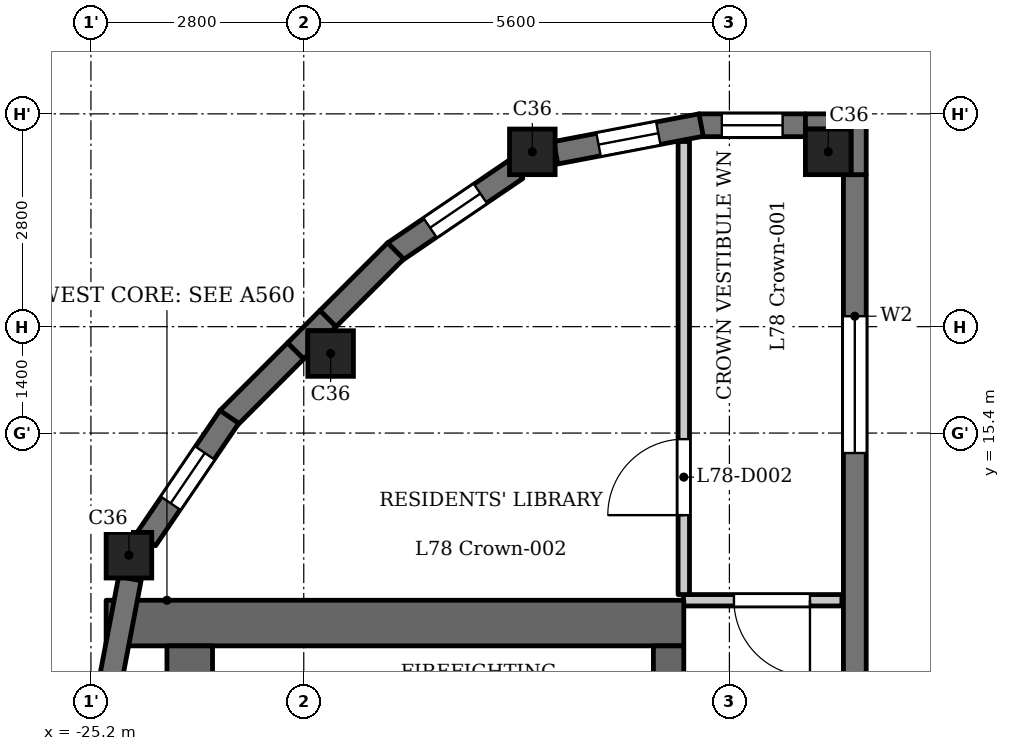
"""IFC4 building model, lengths in metres.
Left out: names, types, materials, properties, quantities, classifications, styles, units other than length and angle.
Written with IfcOpenShell. Run it as: python <this file> out.ifc"""

import sys

from ifc_helpers import new_model, si_unit, direction, frame, frame_2d, origin, origin_2d, place, context, subcontext, project, spatial, polyline, rectangle, outline, extrude, element, fill, save


model = new_model("IFC4")
c1 = context("Model", 3, precision=1e-05, world=origin(), true_north=direction((0.0, 1.0)))
c2 = subcontext(c1, "Body", "Model", "MODEL_VIEW")
j1 = project(units=[si_unit("LENGTHUNIT", "METRE"), si_unit("PLANEANGLEUNIT", "RADIAN")], contexts=[c1])
p1 = place(None, origin())
s1 = spatial("IfcSite", under=j1, at=p1, CompositionType="ELEMENT")
p2 = place(p1, origin())
s2 = spatial("IfcBuilding", under=s1, at=p2, CompositionType="ELEMENT")
p3 = place(p2, frame((0.0, 0.0, 303.4)))
s3 = spatial("IfcBuildingStorey", under=s2, at=p3, CompositionType="ELEMENT", Elevation=303.4)
for number, where, z_axis, x_axis in (
    (1, (-24.7, 13.793, 0.0), (0.0, 0.0, 1.0), (1.0, 0.0, 0.0)),
    (2, (-22.046, 16.446, 0.0), (0.0, 0.0, 1.0), (1.0, 0.0, 0.0)),
    (3, (-19.393, 19.1, 0.0), (0.0, 0.0, 1.0), (1.0, 0.0, 0.0)),
    (4, (-15.5, 19.1, 0.0), (0.0, 0.0, 1.0), (1.0, 0.0, 0.0)),
):
    element("IfcColumn", number, at=place(p3, frame(where, z_axis=z_axis, x_axis=x_axis)), inside=s3, PredefinedType="COLUMN", context=c2, shape_type="SweptSolid", body=[
        extrude(rectangle(XDim=0.6, YDim=0.6, at=origin_2d()), origin(), (0.0, 0.0, 1.0), 3.5),
    ])
p4 = place(p3, frame((-15.15, 11.5, 0.0), z_axis=(0.0, 0.0, 1.0), x_axis=(0.0, 1.0, 0.0)))
e5 = element("IfcWall", 5, at=p4, inside=s3, PredefinedType="SOLIDWALL", context=c2, shape_type="SweptSolid", body=[
    extrude(rectangle(XDim=7.3, YDim=0.3, at=frame_2d((3.65, 0.0))), origin(), (0.0, 0.0, 1.0), 3.2),
])
p5 = place(p4, frame((3.637, 0.0, 0.9)))
e6 = element("IfcOpeningElement", 6, at=p5, cuts=e5, PredefinedType="OPENING", context=c2, shape_type="SweptSolid", body=[
    extrude(rectangle(XDim=1.8, YDim=1.25, at=frame_2d((0.9, 0.625))), frame((0.0, 0.16, 0.0), z_axis=(0.0, -1.0, 0.0), x_axis=(1.0, 0.0, 0.0)), (0.0, 0.0, 1.0), 0.32),
])
p6 = place(p3, frame((-15.8, 19.45, 0.0), z_axis=(0.0, 0.0, 1.0), x_axis=(-1.0, 0.0, 0.0)))
e7 = element("IfcWall", 7, at=p6, inside=s3, PredefinedType="SOLIDWALL", context=c2, shape_type="SweptSolid", body=[
    extrude(rectangle(XDim=1.4, YDim=0.3, at=frame_2d((0.7, 0.0))), origin(), (0.0, 0.0, 1.0), 3.2),
])
p7 = place(p6, frame((0.3, 0.0, 0.6)))
e8 = element("IfcOpeningElement", 8, at=p7, cuts=e7, PredefinedType="OPENING", context=c2, shape_type="SweptSolid", body=[
    extrude(rectangle(XDim=0.8, YDim=1.55, at=frame_2d((0.4, 0.775))), frame((0.0, 0.16, 0.0), z_axis=(0.0, -1.0, 0.0), x_axis=(1.0, 0.0, 0.0)), (0.0, 0.0, 1.0), 0.32),
])
p8 = place(p3, frame((-17.172, 19.453, 0.0), z_axis=(0.0, 0.0, 1.0), x_axis=(-0.982286967073, -0.187382801553, 0.0)))
e9 = element("IfcWall", 9, at=p8, inside=s3, PredefinedType="SOLIDWALL", context=c2, shape_type="SweptSolid", body=[
    extrude(rectangle(XDim=1.948, YDim=0.3, at=frame_2d((0.974, 0.0))), origin(), (0.0, 0.0, 1.0), 2.6),
])
p9 = place(p8, frame((0.574, 0.0, 0.6)))
e10 = element("IfcOpeningElement", 10, at=p9, cuts=e9, PredefinedType="OPENING", context=c2, shape_type="SweptSolid", body=[
    extrude(rectangle(XDim=0.8, YDim=1.55, at=frame_2d((0.4, 0.775))), frame((0.0, 0.16, 0.0), z_axis=(0.0, -1.0, 0.0), x_axis=(1.0, 0.0, 0.0)), (0.0, 0.0, 1.0), 0.32),
])
p10 = place(p3, frame((-19.602, 18.874, 0.0), z_axis=(0.0, 0.0, 1.0), x_axis=(-0.827022075481, -0.562169446579, 0.0)))
e11 = element("IfcWall", 11, at=p10, inside=s3, PredefinedType="SOLIDWALL", context=c2, shape_type="SweptSolid", body=[
    extrude(rectangle(XDim=1.948, YDim=0.3, at=frame_2d((0.974, 0.0))), origin(), (0.0, 0.0, 1.0), 2.6),
])
p11 = place(p10, frame((0.574, 0.0, 0.6)))
e12 = element("IfcOpeningElement", 12, at=p11, cuts=e11, PredefinedType="OPENING", context=c2, shape_type="SweptSolid", body=[
    extrude(rectangle(XDim=0.8, YDim=1.55, at=frame_2d((0.4, 0.775))), frame((0.0, 0.16, 0.0), z_axis=(0.0, -1.0, 0.0), x_axis=(1.0, 0.0, 0.0)), (0.0, 0.0, 1.0), 0.32),
])
for number, where, z_axis, x_axis in (
    (13, (-21.191, 17.797, 0.0), (0.0, 0.0, 1.0), (-0.707, -0.707, 0.0)),
    (14, (-22.506, 16.482, 0.0), (0.0, 0.0, 1.0), (-0.707, -0.707, 0.0)),
):
    element("IfcWall", number, at=place(p3, frame(where, z_axis=z_axis, x_axis=x_axis)), inside=s3, PredefinedType="SOLIDWALL", context=c2, shape_type="SweptSolid", body=[
        extrude(rectangle(XDim=1.26, YDim=0.3, at=frame_2d((0.63, 0.0))), origin(), (0.0, 0.0, 1.0), 3.2),
    ])
p12 = place(p3, frame((-23.379, 15.613, 0.0), z_axis=(0.0, 0.0, 1.0), x_axis=(-0.562025435703, -0.827119948752, 0.0)))
e15 = element("IfcWall", 15, at=p12, inside=s3, PredefinedType="SOLIDWALL", context=c2, shape_type="SweptSolid", body=[
    extrude(rectangle(XDim=1.948, YDim=0.3, at=frame_2d((0.974, 0.0))), origin(), (0.0, 0.0, 1.0), 2.6),
])
p13 = place(p12, frame((0.574, 0.0, 0.6)))
e16 = element("IfcOpeningElement", 16, at=p13, cuts=e15, PredefinedType="OPENING", context=c2, shape_type="SweptSolid", body=[
    extrude(rectangle(XDim=0.8, YDim=1.55, at=frame_2d((0.4, 0.775))), frame((0.0, 0.16, 0.0), z_axis=(0.0, -1.0, 0.0), x_axis=(1.0, 0.0, 0.0)), (0.0, 0.0, 1.0), 0.32),
])
p14 = place(p3, frame((-24.688, 13.485, 0.0), z_axis=(0.0, 0.0, 1.0), x_axis=(-0.187354129902, -0.982292436095, 0.0)))
e17 = element("IfcWall", 17, at=p14, inside=s3, PredefinedType="SOLIDWALL", context=c2, shape_type="SweptSolid", body=[
    extrude(rectangle(XDim=1.947, YDim=0.3, at=frame_2d((0.973, 0.0))), origin(), (0.0, 0.0, 1.0), 2.6),
])
p15 = place(p3, frame((-17.4, 12.9, 0.0), z_axis=(0.0, 0.0, 1.0), x_axis=(-1.0, 0.0, 0.0)))
e18 = element("IfcWall", 18, at=p15, inside=s3, PredefinedType="SHEAR", context=c2, shape_type="SweptSolid", body=[
    extrude(rectangle(XDim=7.6, YDim=0.6, at=frame_2d((3.8, 0.0))), origin(), (0.0, 0.0, 1.0), 3.2),
])
p16 = place(p3, frame((-17.6, -12.6, 0.0), z_axis=(0.0, 0.0, 1.0), x_axis=(0.0, 1.0, 0.0)))
e19 = element("IfcWall", 19, at=p16, inside=s3, PredefinedType="SHEAR", context=c2, shape_type="SweptSolid", body=[
    extrude(rectangle(XDim=25.2, YDim=0.4, at=frame_2d((12.6, 0.0))), origin(), (0.0, 0.0, 1.0), 3.2),
])
p17 = place(p16, frame((8.8, 0.0, 0.0)))
e20 = element("IfcOpeningElement", 20, at=p17, cuts=e19, PredefinedType="OPENING", context=c2, shape_type="SweptSolid", body=[
    extrude(rectangle(XDim=0.9, YDim=2.1, at=frame_2d((0.45, 1.05))), frame((0.0, 0.21, 0.0), z_axis=(0.0, -1.0, 0.0), x_axis=(1.0, 0.0, 0.0)), (0.0, 0.0, 1.0), 0.42),
])
p18 = place(p16, frame((17.05, 0.0, 0.0)))
e21 = element("IfcOpeningElement", 21, at=p18, cuts=e19, PredefinedType="OPENING", context=c2, shape_type="SweptSolid", body=[
    extrude(rectangle(XDim=0.9, YDim=2.1, at=frame_2d((0.45, 1.05))), frame((0.0, 0.21, 0.0), z_axis=(0.0, -1.0, 0.0), x_axis=(1.0, 0.0, 0.0)), (0.0, 0.0, 1.0), 0.42),
])
p19 = place(p16, frame((23.25, 0.0, 0.0)))
e22 = element("IfcOpeningElement", 22, at=p19, cuts=e19, PredefinedType="OPENING", context=c2, shape_type="SweptSolid", body=[
    extrude(rectangle(XDim=1.1, YDim=2.1, at=frame_2d((0.55, 1.05))), frame((0.0, 0.21, 0.0), z_axis=(0.0, -1.0, 0.0), x_axis=(1.0, 0.0, 0.0)), (0.0, 0.0, 1.0), 0.42),
])
p20 = place(p16, frame((0.85, 0.0, 0.0)))
e23 = element("IfcOpeningElement", 23, at=p20, cuts=e19, PredefinedType="OPENING", context=c2, shape_type="SweptSolid", body=[
    extrude(rectangle(XDim=1.1, YDim=2.1, at=frame_2d((0.55, 1.05))), frame((0.0, 0.21, 0.0), z_axis=(0.0, -1.0, 0.0), x_axis=(1.0, 0.0, 0.0)), (0.0, 0.0, 1.0), 0.42),
])
p21 = place(p16, frame((13.075, 0.0, 0.0)))
e24 = element("IfcOpeningElement", 24, at=p21, cuts=e19, PredefinedType="OPENING", context=c2, shape_type="SweptSolid", body=[
    extrude(rectangle(XDim=1.8, YDim=2.1, at=frame_2d((0.9, 1.05))), frame((0.0, 0.21, 0.0), z_axis=(0.0, -1.0, 0.0), x_axis=(1.0, 0.0, 0.0)), (0.0, 0.0, 1.0), 0.42),
])
p22 = place(p3, frame((-23.9, -12.6, 0.0), z_axis=(0.0, 0.0, 1.0), x_axis=(0.0, 1.0, 0.0)))
e25 = element("IfcWall", 25, at=p22, inside=s3, PredefinedType="SHEAR", context=c2, shape_type="SweptSolid", body=[
    extrude(rectangle(XDim=25.2, YDim=0.6, at=frame_2d((12.6, 0.0))), origin(), (0.0, 0.0, 1.0), 3.2),
])
p23 = place(p3, frame((-17.405, 13.2, 0.0), z_axis=(0.0, 0.0, 1.0), x_axis=(1.0, 0.0, 0.0)))
e26 = element("IfcWall", 26, at=p23, inside=s3, PredefinedType="PARTITIONING", context=c2, shape_type="SweptSolid", body=[
    extrude(rectangle(XDim=2.085, YDim=0.15, at=frame_2d((1.042, 0.0))), origin(), (0.0, 0.0, 1.0), 3.2),
])
p24 = place(p23, frame((0.665, 0.0, 0.0)))
e27 = element("IfcOpeningElement", 27, at=p24, cuts=e26, PredefinedType="OPENING", context=c2, shape_type="SweptSolid", body=[
    extrude(rectangle(XDim=1.0, YDim=2.1, at=frame_2d((0.5, 1.05))), frame((0.0, 0.085, 0.0), z_axis=(0.0, -1.0, 0.0), x_axis=(1.0, 0.0, 0.0)), (0.0, 0.0, 1.0), 0.17),
])
p25 = place(p3, frame((-17.4, 13.275, 0.0), z_axis=(0.0, 0.0, 1.0), x_axis=(0.0, 1.0, 0.0)))
e28 = element("IfcWall", 28, at=p25, inside=s3, PredefinedType="PARTITIONING", context=c2, shape_type="SweptSolid", body=[
    extrude(rectangle(XDim=5.961, YDim=0.15, at=frame_2d((2.981, 0.0))), origin(), (0.0, 0.0, 1.0), 3.2),
])
p26 = place(p25, frame((1.045, 0.0, 0.0)))
e29 = element("IfcOpeningElement", 29, at=p26, cuts=e28, PredefinedType="OPENING", context=c2, shape_type="SweptSolid", body=[
    extrude(rectangle(XDim=1.0, YDim=2.1, at=frame_2d((0.5, 1.05))), frame((0.0, 0.085, 0.0), z_axis=(0.0, -1.0, 0.0), x_axis=(1.0, 0.0, 0.0)), (0.0, 0.0, 1.0), 0.17),
])
p27 = place(p3, origin())
e30 = element("IfcWall", 30, at=p27, inside=s3, PredefinedType="SOLIDWALL", context=c2, shape_type="SweptSolid", body=[
    extrude(outline(polyline([(-21.976, 16.8), (-22.188, 17.012), (-22.612, 16.588), (-22.4, 16.376), (-22.346, 16.429), (-22.346, 16.746), (-22.029, 16.746), (-21.976, 16.8)])), origin(), (0.0, 0.0, 1.0), 3.2),
])
e31 = element("IfcWall", 31, at=p27, inside=s3, PredefinedType="SOLIDWALL", context=c2, shape_type="SweptSolid", body=[
    extrude(outline(polyline([(-15.0, 18.8), (-15.0, 19.6), (-15.8, 19.6), (-15.8, 19.4), (-15.2, 19.4), (-15.2, 18.8), (-15.0, 18.8)])), origin(), (0.0, 0.0, 1.0), 3.2),
])
p28 = place(p24, origin())
e32 = element("IfcDoor", 32, at=p28, inside=s3, OperationType="SINGLE_SWING_RIGHT", PredefinedType="DOOR", context=c2, shape_type="SweptSolid", body=[
    extrude(rectangle(XDim=1.0, YDim=2.1, at=frame_2d((0.5, 1.05))), frame((0.0, 0.025, 0.0), z_axis=(0.0, -1.0, 0.0), x_axis=(1.0, 0.0, 0.0)), (0.0, 0.0, 1.0), 0.05),
])
fill(e27, e32)
p29 = place(p26, origin())
e33 = element("IfcDoor", 33, at=p29, inside=s3, OperationType="SINGLE_SWING_RIGHT", PredefinedType="DOOR", context=c2, shape_type="SweptSolid", body=[
    extrude(rectangle(XDim=1.0, YDim=2.1, at=frame_2d((0.5, 1.05))), frame((0.0, 0.025, 0.0), z_axis=(0.0, -1.0, 0.0), x_axis=(1.0, 0.0, 0.0)), (0.0, 0.0, 1.0), 0.05),
])
fill(e29, e33)
p30 = place(p5, origin())
e34 = element("IfcWindow", 34, at=p30, inside=s3, PartitioningType="SINGLE_PANEL", PredefinedType="WINDOW", context=c2, shape_type="SweptSolid", body=[
    extrude(rectangle(XDim=1.8, YDim=1.25, at=frame_2d((0.9, 0.625))), frame((0.0, 0.03, 0.0), z_axis=(0.0, -1.0, 0.0), x_axis=(1.0, 0.0, 0.0)), (0.0, 0.0, 1.0), 0.06),
])
fill(e6, e34)
p31 = place(p7, origin())
e35 = element("IfcWindow", 35, at=p31, inside=s3, PartitioningType="SINGLE_PANEL", PredefinedType="WINDOW", context=c2, shape_type="SweptSolid", body=[
    extrude(rectangle(XDim=0.8, YDim=1.55, at=frame_2d((0.4, 0.775))), frame((0.0, 0.03, 0.0), z_axis=(0.0, -1.0, 0.0), x_axis=(1.0, 0.0, 0.0)), (0.0, 0.0, 1.0), 0.06),
])
fill(e8, e35)
p32 = place(p9, origin())
e36 = element("IfcWindow", 36, at=p32, inside=s3, PartitioningType="SINGLE_PANEL", PredefinedType="WINDOW", context=c2, shape_type="SweptSolid", body=[
    extrude(rectangle(XDim=0.8, YDim=1.55, at=frame_2d((0.4, 0.775))), frame((0.0, 0.03, 0.0), z_axis=(0.0, -1.0, 0.0), x_axis=(1.0, 0.0, 0.0)), (0.0, 0.0, 1.0), 0.06),
])
fill(e10, e36)
p33 = place(p11, origin())
e37 = element("IfcWindow", 37, at=p33, inside=s3, PartitioningType="SINGLE_PANEL", PredefinedType="WINDOW", context=c2, shape_type="SweptSolid", body=[
    extrude(rectangle(XDim=0.8, YDim=1.55, at=frame_2d((0.4, 0.775))), frame((0.0, 0.03, 0.0), z_axis=(0.0, -1.0, 0.0), x_axis=(1.0, 0.0, 0.0)), (0.0, 0.0, 1.0), 0.06),
])
fill(e12, e37)
p34 = place(p13, origin())
e38 = element("IfcWindow", 38, at=p34, inside=s3, PartitioningType="SINGLE_PANEL", PredefinedType="WINDOW", context=c2, shape_type="SweptSolid", body=[
    extrude(rectangle(XDim=0.8, YDim=1.55, at=frame_2d((0.4, 0.775))), frame((0.0, 0.03, 0.0), z_axis=(0.0, -1.0, 0.0), x_axis=(1.0, 0.0, 0.0)), (0.0, 0.0, 1.0), 0.06),
])
fill(e16, e38)
save(model, sys.argv[1])
